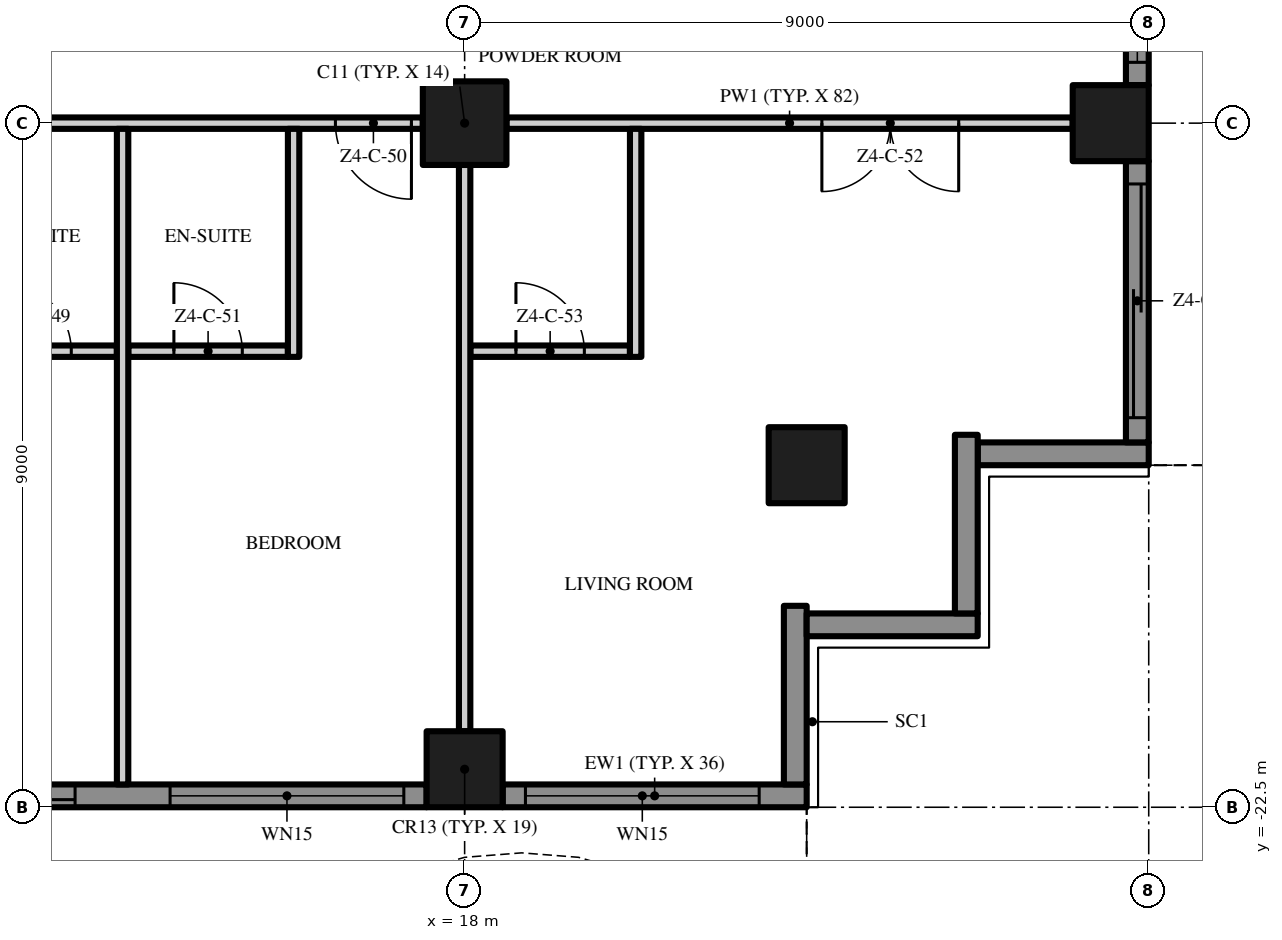
"""IFC4 building model, lengths in metres.
Left out: names, types, materials, properties, quantities, classifications, styles, units other than length and angle.
Written with IfcOpenShell. Run it as: python <this file> out.ifc"""

import sys

from ifc_helpers import new_model, si_unit, direction, frame, frame_2d, origin, origin_2d, place, context, subcontext, project, spatial, polyline, rectangle, outline, extrude, element, fill, save


model = new_model("IFC4")
c1 = context("Model", 3, precision=1e-05, world=origin(), true_north=direction((0.0, 1.0)))
c2 = subcontext(c1, "Body", "Model", "MODEL_VIEW")
j1 = project(units=[si_unit("LENGTHUNIT", "METRE"), si_unit("PLANEANGLEUNIT", "RADIAN")], contexts=[c1])
p1 = place(None, origin())
s1 = spatial("IfcSite", under=j1, at=p1, CompositionType="ELEMENT")
p2 = place(p1, origin())
s2 = spatial("IfcBuilding", under=s1, at=p2, CompositionType="ELEMENT")
p3 = place(p2, frame((0.0, 0.0, 211.0)))
s3 = spatial("IfcBuildingStorey", under=s2, at=p3, CompositionType="ELEMENT", Elevation=211.0)
p4 = place(p3, frame((18.0, -13.5, 0.0), z_axis=(0.0, 0.0, 1.0), x_axis=(1.0, 0.0, 0.0)))
e1 = element("IfcColumn", 1, at=p4, inside=s3, PredefinedType="COLUMN", context=c2, shape_type="SweptSolid", body=[
    extrude(rectangle(XDim=1.1, YDim=1.1, at=origin_2d()), origin(), (0.0, 0.0, 1.0), 3.5),
])
for number, where, z_axis, x_axis in (
    (2, (18.0, -22.0, 0.0), (0.0, 0.0, 1.0), (1.0, 0.0, 0.0)),
    (3, (26.5, -13.5, 0.0), (0.0, 0.0, 1.0), (1.0, 0.0, 0.0)),
    (4, (22.5, -18.0, 0.0), (0.0, 0.0, 1.0), (1.0, 0.0, 0.0)),
):
    element("IfcColumn", number, at=place(p3, frame(where, z_axis=z_axis, x_axis=x_axis)), inside=s3, PredefinedType="COLUMN", context=c2, shape_type="SweptSolid", body=[
        extrude(rectangle(XDim=1.0, YDim=1.0, at=origin_2d()), origin(), (0.0, 0.0, 1.0), 3.5),
    ])
p5 = place(p3, frame((17.5, -22.35, 0.0), z_axis=(0.0, 0.0, 1.0), x_axis=(-1.0, 0.0, 0.0)))
e5 = element("IfcWall", 5, at=p5, inside=s3, PredefinedType="SOLIDWALL", context=c2, shape_type="SweptSolid", body=[
    extrude(rectangle(XDim=8.0, YDim=0.3, at=frame_2d((4.0, 0.0))), origin(), (0.0, 0.0, 1.0), 3.5),
])
p6 = place(p5, frame((4.625, 0.0, 0.0)))
e6 = element("IfcOpeningElement", 6, at=p6, cuts=e5, PredefinedType="OPENING", context=c2, shape_type="SweptSolid", body=[
    extrude(rectangle(XDim=3.075, YDim=2.4, at=frame_2d((1.538, 1.2))), frame((0.0, 0.16, 0.0), z_axis=(0.0, -1.0, 0.0), x_axis=(1.0, 0.0, 0.0)), (0.0, 0.0, 1.0), 0.32),
])
p7 = place(p5, frame((0.3, 0.0, 0.45)))
e7 = element("IfcOpeningElement", 7, at=p7, cuts=e5, PredefinedType="OPENING", context=c2, shape_type="SweptSolid", body=[
    extrude(rectangle(XDim=3.075, YDim=2.65, at=frame_2d((1.538, 1.325))), frame((0.0, 0.16, 0.0), z_axis=(0.0, -1.0, 0.0), x_axis=(1.0, 0.0, 0.0)), (0.0, 0.0, 1.0), 0.32),
])
p8 = place(p3, frame((22.5, -22.35, 0.0), z_axis=(0.0, 0.0, 1.0), x_axis=(-1.0, 0.0, 0.0)))
e8 = element("IfcWall", 8, at=p8, inside=s3, PredefinedType="SOLIDWALL", context=c2, shape_type="SweptSolid", body=[
    extrude(rectangle(XDim=4.0, YDim=0.3, at=frame_2d((2.0, 0.0))), origin(), (0.0, 0.0, 1.0), 3.5),
])
p9 = place(p8, frame((0.625, 0.0, 0.45)))
e9 = element("IfcOpeningElement", 9, at=p9, cuts=e8, PredefinedType="OPENING", context=c2, shape_type="SweptSolid", body=[
    extrude(rectangle(XDim=3.075, YDim=2.65, at=frame_2d((1.538, 1.325))), frame((0.0, 0.16, 0.0), z_axis=(0.0, -1.0, 0.0), x_axis=(1.0, 0.0, 0.0)), (0.0, 0.0, 1.0), 0.32),
])
p10 = place(p3, frame((22.35, -19.85, 0.0), z_axis=(0.0, 0.0, 1.0), x_axis=(0.0, -1.0, 0.0)))
e10 = element("IfcWall", 10, at=p10, inside=s3, PredefinedType="SOLIDWALL", context=c2, shape_type="SweptSolid", body=[
    extrude(rectangle(XDim=2.35, YDim=0.3, at=frame_2d((1.175, 0.0))), origin(), (0.0, 0.0, 1.0), 3.5),
])
p11 = place(p3, frame((24.75, -20.1, 0.0), z_axis=(0.0, 0.0, 1.0), x_axis=(-1.0, 0.0, 0.0)))
e11 = element("IfcWall", 11, at=p11, inside=s3, PredefinedType="SOLIDWALL", context=c2, shape_type="SweptSolid", body=[
    extrude(rectangle(XDim=2.25, YDim=0.3, at=frame_2d((1.125, 0.0))), origin(), (0.0, 0.0, 1.0), 3.5),
])
p12 = place(p3, frame((24.6, -17.6, 0.0), z_axis=(0.0, 0.0, 1.0), x_axis=(0.0, -1.0, 0.0)))
e12 = element("IfcWall", 12, at=p12, inside=s3, PredefinedType="SOLIDWALL", context=c2, shape_type="SweptSolid", body=[
    extrude(rectangle(XDim=2.35, YDim=0.3, at=frame_2d((1.175, 0.0))), origin(), (0.0, 0.0, 1.0), 3.5),
])
p13 = place(p3, frame((27.0, -17.85, 0.0), z_axis=(0.0, 0.0, 1.0), x_axis=(-1.0, 0.0, 0.0)))
e13 = element("IfcWall", 13, at=p13, inside=s3, PredefinedType="SOLIDWALL", context=c2, shape_type="SweptSolid", body=[
    extrude(rectangle(XDim=2.25, YDim=0.3, at=frame_2d((1.125, 0.0))), origin(), (0.0, 0.0, 1.0), 3.5),
])
p14 = place(p3, frame((26.85, -14.0, 0.0), z_axis=(0.0, 0.0, 1.0), x_axis=(0.0, -1.0, 0.0)))
e14 = element("IfcWall", 14, at=p14, inside=s3, PredefinedType="SOLIDWALL", context=c2, shape_type="SweptSolid", body=[
    extrude(rectangle(XDim=3.7, YDim=0.3, at=frame_2d((1.85, 0.0))), origin(), (0.0, 0.0, 1.0), 3.5),
])
p15 = place(p14, frame((0.3, 0.0, 0.0)))
e15 = element("IfcOpeningElement", 15, at=p15, cuts=e14, PredefinedType="OPENING", context=c2, shape_type="SweptSolid", body=[
    extrude(rectangle(XDim=3.075, YDim=2.4, at=frame_2d((1.538, 1.2))), frame((0.0, 0.16, 0.0), z_axis=(0.0, -1.0, 0.0), x_axis=(1.0, 0.0, 0.0)), (0.0, 0.0, 1.0), 0.32),
])
p16 = place(p3, frame((26.85, -5.0, 0.0), z_axis=(0.0, 0.0, 1.0), x_axis=(0.0, -1.0, 0.0)))
e16 = element("IfcWall", 16, at=p16, inside=s3, PredefinedType="SOLIDWALL", context=c2, shape_type="SweptSolid", body=[
    extrude(rectangle(XDim=8.0, YDim=0.3, at=frame_2d((4.0, 0.0))), origin(), (0.0, 0.0, 1.0), 3.5),
])
p17 = place(p16, frame((4.625, 0.0, 0.45)))
e17 = element("IfcOpeningElement", 17, at=p17, cuts=e16, PredefinedType="OPENING", context=c2, shape_type="SweptSolid", body=[
    extrude(rectangle(XDim=3.075, YDim=2.65, at=frame_2d((1.538, 1.325))), frame((0.0, 0.16, 0.0), z_axis=(0.0, -1.0, 0.0), x_axis=(1.0, 0.0, 0.0)), (0.0, 0.0, 1.0), 0.32),
])
p18 = place(p16, frame((0.3, 0.0, 0.45)))
e18 = element("IfcOpeningElement", 18, at=p18, cuts=e16, PredefinedType="OPENING", context=c2, shape_type="SweptSolid", body=[
    extrude(rectangle(XDim=3.075, YDim=2.65, at=frame_2d((1.538, 1.325))), frame((0.0, 0.16, 0.0), z_axis=(0.0, -1.0, 0.0), x_axis=(1.0, 0.0, 0.0)), (0.0, 0.0, 1.0), 0.32),
])
p19 = place(p3, origin())
e19 = element("IfcWall", 19, at=p19, inside=s3, PredefinedType="USERDEFINED", context=c2, shape_type="SweptSolid", body=[
    extrude(outline(polyline([(-22.5, -24.3), (-21.0, -25.005), (-19.5, -25.441), (-18.75, -25.5), (-18.0, -25.441), (-16.5, -25.005), (-15.0, -24.3), (-13.5, -23.595), (-12.0, -23.159), (-11.25, -23.1), (-10.5, -23.159), (-9.0, -23.595), (-7.5, -24.3), (-6.0, -25.005), (-4.5, -25.441), (-3.75, -25.5), (-3.0, -25.441), (-1.5, -25.005), (0.0, -24.3), (1.5, -23.595), (3.0, -23.159), (3.75, -23.1), (4.5, -23.159), (6.0, -23.595), (7.5, -24.3), (9.0, -25.005), (10.5, -25.441), (11.25, -25.5), (12.0, -25.441), (13.5, -25.005), (15.0, -24.3), (16.5, -23.595), (18.0, -23.159), (18.75, -23.1), (19.5, -23.159), (21.0, -23.595), (22.5, -24.3), (22.606, -24.074), (21.089, -23.36), (19.545, -22.911), (18.75, -22.849), (17.955, -22.911), (16.411, -23.36), (14.894, -24.074), (13.411, -24.771), (11.955, -25.194), (11.25, -25.249), (10.545, -25.194), (9.089, -24.771), (7.606, -24.074), (6.089, -23.36), (4.545, -22.911), (3.75, -22.849), (2.955, -22.911), (1.411, -23.36), (-0.106, -24.074), (-1.589, -24.771), (-3.045, -25.194), (-3.75, -25.249), (-4.455, -25.194), (-5.911, -24.771), (-7.394, -24.074), (-8.911, -23.36), (-10.455, -22.911), (-11.25, -22.849), (-12.045, -22.911), (-13.589, -23.36), (-15.106, -24.074), (-16.589, -24.771), (-18.045, -25.194), (-18.75, -25.249), (-19.455, -25.194), (-20.911, -24.771), (-22.394, -24.074), (-22.5, -24.3)])), origin(), (0.0, 0.0, 1.0), 0.9),
])
p20 = place(p3, origin())
e20 = element("IfcWall", 20, at=p20, inside=s3, PredefinedType="USERDEFINED", context=c2, shape_type="SweptSolid", body=[
    extrude(outline(polyline([(28.8, -18.0), (29.505, -16.5), (29.941, -15.0), (30.0, -14.25), (29.941, -13.5), (29.505, -12.0), (28.8, -10.5), (28.095, -9.0), (27.659, -7.5), (27.6, -6.75), (27.659, -6.0), (28.095, -4.5), (28.8, -3.0), (29.505, -1.5), (29.941, 0.0), (30.0, 0.75), (29.941, 1.5), (29.505, 3.0), (28.8, 4.5), (28.095, 6.0), (27.659, 7.5), (27.6, 8.25), (27.659, 9.0), (28.095, 10.5), (28.8, 12.0), (29.505, 13.5), (29.941, 15.0), (30.0, 15.75), (29.941, 16.5), (29.505, 18.0), (29.265, 17.93), (29.694, 16.455), (29.749, 15.75), (29.694, 15.045), (29.271, 13.589), (28.574, 12.106), (27.86, 10.589), (27.411, 9.045), (27.349, 8.25), (27.411, 7.455), (27.86, 5.911), (28.574, 4.394), (29.271, 2.911), (29.694, 1.455), (29.749, 0.75), (29.694, 0.045), (29.271, -1.411), (28.574, -2.894), (27.86, -4.411), (27.411, -5.955), (27.349, -6.75), (27.411, -7.545), (27.86, -9.089), (28.574, -10.606), (29.271, -12.089), (29.694, -13.545), (29.749, -14.25), (29.694, -14.955), (29.271, -16.411), (28.574, -17.894), (28.8, -18.0)])), origin(), (0.0, 0.0, 1.0), 0.9),
])
p21 = place(p3, frame((11.325, -16.5, 0.0), z_axis=(0.0, 0.0, 1.0), x_axis=(1.0, 0.0, 0.0)))
e21 = element("IfcWall", 21, at=p21, inside=s3, PredefinedType="PARTITIONING", context=c2, shape_type="SweptSolid", body=[
    extrude(rectangle(XDim=2.1, YDim=0.15, at=frame_2d((1.05, 0.0))), origin(), (0.0, 0.0, 1.0), 3.5),
])
p22 = place(p21, frame((0.6, 0.0, 0.0)))
e22 = element("IfcOpeningElement", 22, at=p22, cuts=e21, PredefinedType="OPENING", context=c2, shape_type="SweptSolid", body=[
    extrude(rectangle(XDim=0.9, YDim=2.1, at=frame_2d((0.45, 1.05))), frame((0.0, 0.085, 0.0), z_axis=(0.0, -1.0, 0.0), x_axis=(1.0, 0.0, 0.0)), (0.0, 0.0, 1.0), 0.17),
])
p23 = place(p3, frame((13.575, -16.5, 0.0), z_axis=(0.0, 0.0, 1.0), x_axis=(1.0, 0.0, 0.0)))
e23 = element("IfcWall", 23, at=p23, inside=s3, PredefinedType="PARTITIONING", context=c2, shape_type="SweptSolid", body=[
    extrude(rectangle(XDim=2.1, YDim=0.15, at=frame_2d((1.05, 0.0))), origin(), (0.0, 0.0, 1.0), 3.5),
])
p24 = place(p23, frame((0.6, 0.0, 0.0)))
e24 = element("IfcOpeningElement", 24, at=p24, cuts=e23, PredefinedType="OPENING", context=c2, shape_type="SweptSolid", body=[
    extrude(rectangle(XDim=0.9, YDim=2.1, at=frame_2d((0.45, 1.05))), frame((0.0, 0.085, 0.0), z_axis=(0.0, -1.0, 0.0), x_axis=(1.0, 0.0, 0.0)), (0.0, 0.0, 1.0), 0.17),
])
p25 = place(p3, frame((18.075, -16.5, 0.0), z_axis=(0.0, 0.0, 1.0), x_axis=(1.0, 0.0, 0.0)))
e25 = element("IfcWall", 25, at=p25, inside=s3, PredefinedType="PARTITIONING", context=c2, shape_type="SweptSolid", body=[
    extrude(rectangle(XDim=2.1, YDim=0.15, at=frame_2d((1.05, 0.0))), origin(), (0.0, 0.0, 1.0), 3.5),
])
p26 = place(p25, frame((0.6, 0.0, 0.0)))
e26 = element("IfcOpeningElement", 26, at=p26, cuts=e25, PredefinedType="OPENING", context=c2, shape_type="SweptSolid", body=[
    extrude(rectangle(XDim=0.9, YDim=2.1, at=frame_2d((0.45, 1.05))), frame((0.0, 0.085, 0.0), z_axis=(0.0, -1.0, 0.0), x_axis=(1.0, 0.0, 0.0)), (0.0, 0.0, 1.0), 0.17),
])
p27 = place(p3, frame((17.45, -13.5, 0.0), z_axis=(0.0, 0.0, 1.0), x_axis=(-1.0, 0.0, 0.0)))
e27 = element("IfcWall", 27, at=p27, inside=s3, PredefinedType="PARTITIONING", context=c2, shape_type="SweptSolid", body=[
    extrude(rectangle(XDim=7.9, YDim=0.15, at=frame_2d((3.95, 0.0))), origin(), (0.0, 0.0, 1.0), 3.5),
])
p28 = place(p27, frame((6.75, 0.0, 0.0)))
e28 = element("IfcOpeningElement", 28, at=p28, cuts=e27, PredefinedType="OPENING", context=c2, shape_type="SweptSolid", body=[
    extrude(rectangle(XDim=1.0, YDim=2.4, at=frame_2d((0.5, 1.2))), frame((0.0, 0.085, 0.0), z_axis=(0.0, -1.0, 0.0), x_axis=(1.0, 0.0, 0.0)), (0.0, 0.0, 1.0), 0.17),
])
p29 = place(p27, frame((0.15, 0.0, 0.0)))
e29 = element("IfcOpeningElement", 29, at=p29, cuts=e27, PredefinedType="OPENING", context=c2, shape_type="SweptSolid", body=[
    extrude(rectangle(XDim=1.0, YDim=2.4, at=frame_2d((0.5, 1.2))), frame((0.0, 0.085, 0.0), z_axis=(0.0, -1.0, 0.0), x_axis=(1.0, 0.0, 0.0)), (0.0, 0.0, 1.0), 0.17),
])
p30 = place(p3, frame((26.0, -13.5, 0.0), z_axis=(0.0, 0.0, 1.0), x_axis=(-1.0, 0.0, 0.0)))
e30 = element("IfcWall", 30, at=p30, inside=s3, PredefinedType="PARTITIONING", context=c2, shape_type="SweptSolid", body=[
    extrude(rectangle(XDim=7.45, YDim=0.15, at=frame_2d((3.725, 0.0))), origin(), (0.0, 0.0, 1.0), 3.5),
])
p31 = place(p30, frame((1.5, 0.0, 0.0)))
e31 = element("IfcOpeningElement", 31, at=p31, cuts=e30, PredefinedType="OPENING", context=c2, shape_type="SweptSolid", body=[
    extrude(rectangle(XDim=1.8, YDim=2.4, at=frame_2d((0.9, 1.2))), frame((0.0, 0.085, 0.0), z_axis=(0.0, -1.0, 0.0), x_axis=(1.0, 0.0, 0.0)), (0.0, 0.0, 1.0), 0.17),
])
p32 = place(p3, frame((13.5, -22.2, 0.0), z_axis=(0.0, 0.0, 1.0), x_axis=(0.0, 1.0, 0.0)))
e32 = element("IfcWall", 32, at=p32, inside=s3, PredefinedType="PARTITIONING", context=c2, shape_type="SweptSolid", body=[
    extrude(rectangle(XDim=8.625, YDim=0.15, at=frame_2d((4.312, 0.0))), origin(), (0.0, 0.0, 1.0), 3.5),
])
p33 = place(p3, frame((15.75, -16.575, 0.0), z_axis=(0.0, 0.0, 1.0), x_axis=(0.0, 1.0, 0.0)))
e33 = element("IfcWall", 33, at=p33, inside=s3, PredefinedType="PARTITIONING", context=c2, shape_type="SweptSolid", body=[
    extrude(rectangle(XDim=3.0, YDim=0.15, at=frame_2d((1.5, 0.0))), origin(), (0.0, 0.0, 1.0), 3.5),
])
p34 = place(p3, frame((18.0, -21.5, 0.0), z_axis=(0.0, 0.0, 1.0), x_axis=(0.0, 1.0, 0.0)))
e34 = element("IfcWall", 34, at=p34, inside=s3, PredefinedType="PARTITIONING", context=c2, shape_type="SweptSolid", body=[
    extrude(rectangle(XDim=7.45, YDim=0.15, at=frame_2d((3.725, 0.0))), origin(), (0.0, 0.0, 1.0), 3.5),
])
p35 = place(p3, frame((20.25, -16.575, 0.0), z_axis=(0.0, 0.0, 1.0), x_axis=(0.0, 1.0, 0.0)))
e35 = element("IfcWall", 35, at=p35, inside=s3, PredefinedType="PARTITIONING", context=c2, shape_type="SweptSolid", body=[
    extrude(rectangle(XDim=3.0, YDim=0.15, at=frame_2d((1.5, 0.0))), origin(), (0.0, 0.0, 1.0), 3.5),
])
p36 = place(p6, origin())
e36 = element("IfcDoor", 36, at=p36, inside=s3, OperationType="SINGLE_SWING_LEFT", PredefinedType="DOOR", context=c2, shape_type="SweptSolid", body=[
    extrude(rectangle(XDim=3.075, YDim=2.4, at=frame_2d((1.538, 1.2))), frame((0.0, 0.025, 0.0), z_axis=(0.0, -1.0, 0.0), x_axis=(1.0, 0.0, 0.0)), (0.0, 0.0, 1.0), 0.05),
])
fill(e6, e36)
p37 = place(p7, origin())
e37 = element("IfcWindow", 37, at=p37, inside=s3, PartitioningType="SINGLE_PANEL", PredefinedType="WINDOW", context=c2, shape_type="SweptSolid", body=[
    extrude(rectangle(XDim=3.075, YDim=2.65, at=frame_2d((1.538, 1.325))), frame((0.0, 0.03, 0.0), z_axis=(0.0, -1.0, 0.0), x_axis=(1.0, 0.0, 0.0)), (0.0, 0.0, 1.0), 0.06),
])
fill(e7, e37)
p38 = place(p9, origin())
e38 = element("IfcWindow", 38, at=p38, inside=s3, PartitioningType="SINGLE_PANEL", PredefinedType="WINDOW", context=c2, shape_type="SweptSolid", body=[
    extrude(rectangle(XDim=3.075, YDim=2.65, at=frame_2d((1.538, 1.325))), frame((0.0, 0.03, 0.0), z_axis=(0.0, -1.0, 0.0), x_axis=(1.0, 0.0, 0.0)), (0.0, 0.0, 1.0), 0.06),
])
fill(e9, e38)
p39 = place(p15, origin())
e39 = element("IfcDoor", 39, at=p39, inside=s3, OperationType="SINGLE_SWING_LEFT", PredefinedType="DOOR", context=c2, shape_type="SweptSolid", body=[
    extrude(rectangle(XDim=3.075, YDim=2.4, at=frame_2d((1.538, 1.2))), frame((0.0, 0.025, 0.0), z_axis=(0.0, -1.0, 0.0), x_axis=(1.0, 0.0, 0.0)), (0.0, 0.0, 1.0), 0.05),
])
fill(e15, e39)
p40 = place(p17, origin())
e40 = element("IfcWindow", 40, at=p40, inside=s3, PartitioningType="SINGLE_PANEL", PredefinedType="WINDOW", context=c2, shape_type="SweptSolid", body=[
    extrude(rectangle(XDim=3.075, YDim=2.65, at=frame_2d((1.538, 1.325))), frame((0.0, 0.03, 0.0), z_axis=(0.0, -1.0, 0.0), x_axis=(1.0, 0.0, 0.0)), (0.0, 0.0, 1.0), 0.06),
])
fill(e17, e40)
p41 = place(p22, origin())
e41 = element("IfcDoor", 41, at=p41, inside=s3, OperationType="SINGLE_SWING_LEFT", PredefinedType="DOOR", context=c2, shape_type="SweptSolid", body=[
    extrude(rectangle(XDim=0.9, YDim=2.1, at=frame_2d((0.45, 1.05))), frame((0.0, 0.025, 0.0), z_axis=(0.0, -1.0, 0.0), x_axis=(1.0, 0.0, 0.0)), (0.0, 0.0, 1.0), 0.05),
])
fill(e22, e41)
p42 = place(p29, origin())
e42 = element("IfcDoor", 42, at=p42, inside=s3, OperationType="SINGLE_SWING_LEFT", PredefinedType="DOOR", context=c2, shape_type="SweptSolid", body=[
    extrude(rectangle(XDim=1.0, YDim=2.4, at=frame_2d((0.5, 1.2))), frame((0.0, 0.025, 0.0), z_axis=(0.0, -1.0, 0.0), x_axis=(1.0, 0.0, 0.0)), (0.0, 0.0, 1.0), 0.05),
])
fill(e29, e42)
p43 = place(p24, origin())
e43 = element("IfcDoor", 43, at=p43, inside=s3, OperationType="SINGLE_SWING_LEFT", PredefinedType="DOOR", context=c2, shape_type="SweptSolid", body=[
    extrude(rectangle(XDim=0.9, YDim=2.1, at=frame_2d((0.45, 1.05))), frame((0.0, 0.025, 0.0), z_axis=(0.0, -1.0, 0.0), x_axis=(1.0, 0.0, 0.0)), (0.0, 0.0, 1.0), 0.05),
])
fill(e24, e43)
p44 = place(p31, origin())
e44 = element("IfcDoor", 44, at=p44, inside=s3, OperationType="DOUBLE_DOOR_SINGLE_SWING", PredefinedType="DOOR", context=c2, shape_type="SweptSolid", body=[
    extrude(rectangle(XDim=1.8, YDim=2.4, at=frame_2d((0.9, 1.2))), frame((0.0, 0.025, 0.0), z_axis=(0.0, -1.0, 0.0), x_axis=(1.0, 0.0, 0.0)), (0.0, 0.0, 1.0), 0.05),
])
fill(e31, e44)
p45 = place(p26, origin())
e45 = element("IfcDoor", 45, at=p45, inside=s3, OperationType="SINGLE_SWING_LEFT", PredefinedType="DOOR", context=c2, shape_type="SweptSolid", body=[
    extrude(rectangle(XDim=0.9, YDim=2.1, at=frame_2d((0.45, 1.05))), frame((0.0, 0.025, 0.0), z_axis=(0.0, -1.0, 0.0), x_axis=(1.0, 0.0, 0.0)), (0.0, 0.0, 1.0), 0.05),
])
fill(e26, e45)
save(model, sys.argv[1])
